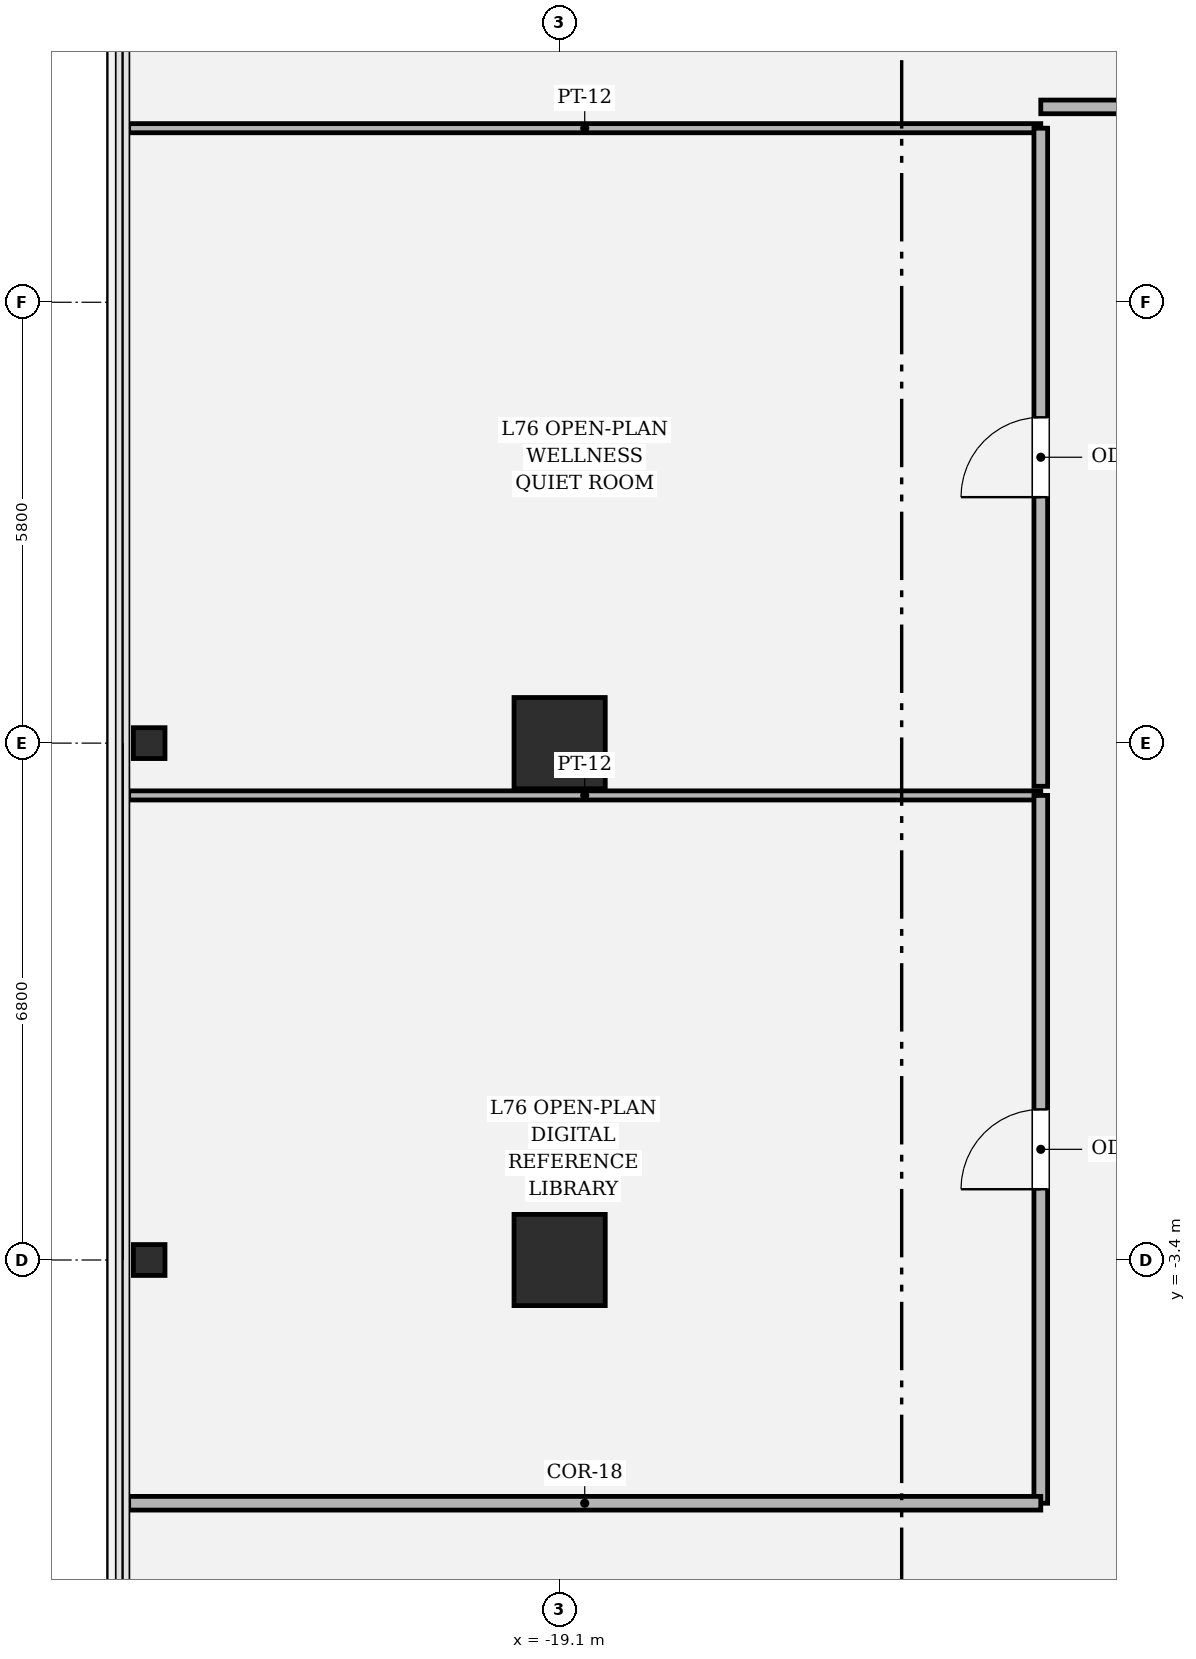
"""IFC4 building model, lengths in metres.
Left out: names, types, materials, properties, quantities, classifications, styles, units other than length and angle.
Written with IfcOpenShell. Run it as: python <this file> out.ifc"""

import sys

from ifc_helpers import new_model, si_unit, direction, frame, frame_2d, origin, origin_2d, place, context, subcontext, project, spatial, rectangle, hollow_rectangle, i_section, extrude, element, fill, save


model = new_model("IFC4")
c1 = context("Model", 3, precision=1e-05, world=origin(), true_north=direction((0.0, 1.0)))
c2 = subcontext(c1, "Body", "Model", "MODEL_VIEW")
j1 = project(units=[si_unit("LENGTHUNIT", "METRE"), si_unit("PLANEANGLEUNIT", "RADIAN")], contexts=[c1])
p1 = place(None, origin())
s1 = spatial("IfcSite", under=j1, at=p1, CompositionType="ELEMENT")
p2 = place(p1, origin())
s2 = spatial("IfcBuilding", under=s1, at=p2, CompositionType="ELEMENT")
p3 = place(p2, frame((0.0, 0.0, 321.6)))
s3 = spatial("IfcBuildingStorey", under=s2, at=p3, CompositionType="ELEMENT", Elevation=321.6)
for number, where, z_axis, x_axis in (
    (1, (-19.1, 3.4, 0.0), (0.0, 0.0, 1.0), (1.0, 0.0, 0.0)),
    (2, (-19.1, -3.4, 0.0), (0.0, 0.0, 1.0), (1.0, 0.0, 0.0)),
):
    element("IfcColumn", number, at=place(p3, frame(where, z_axis=z_axis, x_axis=x_axis)), inside=s3, PredefinedType="COLUMN", context=c2, shape_type="SweptSolid", body=[
        extrude(hollow_rectangle(XDim=1.2, YDim=1.2, WallThickness=0.035, at=origin_2d()), origin(), (0.0, 0.0, 1.0), 4.2),
    ])
for number, where, z_axis, x_axis in (
    (3, (-24.5, -3.4, 0.0), (0.0, 0.0, 1.0), (0.0, 1.0, 0.0)),
    (4, (-24.5, 3.4, 0.0), (0.0, 0.0, 1.0), (0.0, 1.0, 0.0)),
):
    element("IfcColumn", number, at=place(p3, frame(where, z_axis=z_axis, x_axis=x_axis)), inside=s3, PredefinedType="COLUMN", context=c2, shape_type="SweptSolid", body=[
        extrude(i_section(OverallWidth=0.406, OverallDepth=0.416, WebThickness=0.029, FlangeThickness=0.048, FilletRadius=0.018, at=origin_2d()), origin(), (0.0, 0.0, 1.0), 4.198),
    ])
p4 = place(p3, frame((-24.77, 2.712, 0.0), z_axis=(0.0, 0.0, 1.0), x_axis=(1.0, 0.0, 0.0)))
e5 = element("IfcWall", 5, at=p4, inside=s3, PredefinedType="PARTITIONING", context=c2, shape_type="SweptSolid", body=[
    extrude(rectangle(XDim=12.0, YDim=0.12, at=frame_2d((6.0, 0.0))), origin(), (0.0, 0.0, 1.0), 2.714),
])
p5 = place(p3, frame((-12.77, 2.712, 0.0), z_axis=(0.0, 0.0, 1.0), x_axis=(0.0, -1.0, 0.0)))
e6 = element("IfcWall", 6, at=p5, inside=s3, PredefinedType="PARTITIONING", context=c2, shape_type="SweptSolid", body=[
    extrude(rectangle(XDim=9.312, YDim=0.18, at=frame_2d((4.656, 0.0))), origin(), (0.0, 0.0, 1.0), 3.394),
])
p6 = place(p5, frame((4.131, 0.0, 0.0)))
e7 = element("IfcOpeningElement", 7, at=p6, cuts=e6, PredefinedType="OPENING", context=c2, shape_type="SweptSolid", body=[
    extrude(rectangle(XDim=1.05, YDim=2.2, at=frame_2d((0.525, 1.1))), frame((0.0, 0.1, 0.0), z_axis=(0.0, -1.0, 0.0), x_axis=(1.0, 0.0, 0.0)), (0.0, 0.0, 1.0), 0.2),
])
p7 = place(p3, frame((-12.77, -6.6, 0.0), z_axis=(0.0, 0.0, 1.0), x_axis=(-1.0, 0.0, 0.0)))
e8 = element("IfcWall", 8, at=p7, inside=s3, PredefinedType="PARTITIONING", context=c2, shape_type="SweptSolid", body=[
    extrude(rectangle(XDim=12.0, YDim=0.18, at=frame_2d((6.0, 0.0))), origin(), (0.0, 0.0, 1.0), 2.714),
])
p8 = place(p3, frame((-24.77, 11.49, 0.0), z_axis=(0.0, 0.0, 1.0), x_axis=(1.0, 0.0, 0.0)))
e9 = element("IfcWall", 9, at=p8, inside=s3, PredefinedType="PARTITIONING", context=c2, shape_type="SweptSolid", body=[
    extrude(rectangle(XDim=12.0, YDim=0.12, at=frame_2d((6.0, 0.0))), origin(), (0.0, 0.0, 1.0), 2.714),
])
p9 = place(p3, frame((-12.77, 11.49, 0.0), z_axis=(0.0, 0.0, 1.0), x_axis=(0.0, -1.0, 0.0)))
e10 = element("IfcWall", 10, at=p9, inside=s3, PredefinedType="PARTITIONING", context=c2, shape_type="SweptSolid", body=[
    extrude(rectangle(XDim=8.658, YDim=0.18, at=frame_2d((4.329, 0.0))), origin(), (0.0, 0.0, 1.0), 3.394),
])
p10 = place(p9, frame((3.804, 0.0, 0.0)))
e11 = element("IfcOpeningElement", 11, at=p10, cuts=e10, PredefinedType="OPENING", context=c2, shape_type="SweptSolid", body=[
    extrude(rectangle(XDim=1.05, YDim=2.2, at=frame_2d((0.525, 1.1))), frame((0.0, 0.1, 0.0), z_axis=(0.0, -1.0, 0.0), x_axis=(1.0, 0.0, 0.0)), (0.0, 0.0, 1.0), 0.2),
])
p11 = place(p3, frame((-6.627, 11.77, 0.0), z_axis=(0.0, 0.0, 1.0), x_axis=(-1.0, 0.0, 0.0)))
e12 = element("IfcWall", 12, at=p11, inside=s3, PredefinedType="PARTITIONING", context=c2, shape_type="SweptSolid", body=[
    extrude(rectangle(XDim=6.143, YDim=0.18, at=frame_2d((3.072, 0.0))), origin(), (0.0, 0.0, 1.0), 3.394),
])
p12 = place(p11, frame((2.546, 0.0, 0.0)))
e13 = element("IfcOpeningElement", 13, at=p12, cuts=e12, PredefinedType="OPENING", context=c2, shape_type="SweptSolid", body=[
    extrude(rectangle(XDim=1.05, YDim=2.2, at=frame_2d((0.525, 1.1))), frame((0.0, 0.1, 0.0), z_axis=(0.0, -1.0, 0.0), x_axis=(1.0, 0.0, 0.0)), (0.0, 0.0, 1.0), 0.2),
])
p13 = place(p6, origin())
e14 = element("IfcDoor", 14, at=p13, inside=s3, OperationType="SINGLE_SWING_RIGHT", PredefinedType="DOOR", context=c2, shape_type="SweptSolid", body=[
    extrude(rectangle(XDim=1.05, YDim=2.2, at=frame_2d((0.525, 1.1))), frame((0.0, 0.025, 0.0), z_axis=(0.0, -1.0, 0.0), x_axis=(1.0, 0.0, 0.0)), (0.0, 0.0, 1.0), 0.05),
])
fill(e7, e14)
p14 = place(p10, origin())
e15 = element("IfcDoor", 15, at=p14, inside=s3, OperationType="SINGLE_SWING_RIGHT", PredefinedType="DOOR", context=c2, shape_type="SweptSolid", body=[
    extrude(rectangle(XDim=1.05, YDim=2.2, at=frame_2d((0.525, 1.1))), frame((0.0, 0.025, 0.0), z_axis=(0.0, -1.0, 0.0), x_axis=(1.0, 0.0, 0.0)), (0.0, 0.0, 1.0), 0.05),
])
fill(e11, e15)
save(model, sys.argv[1])
